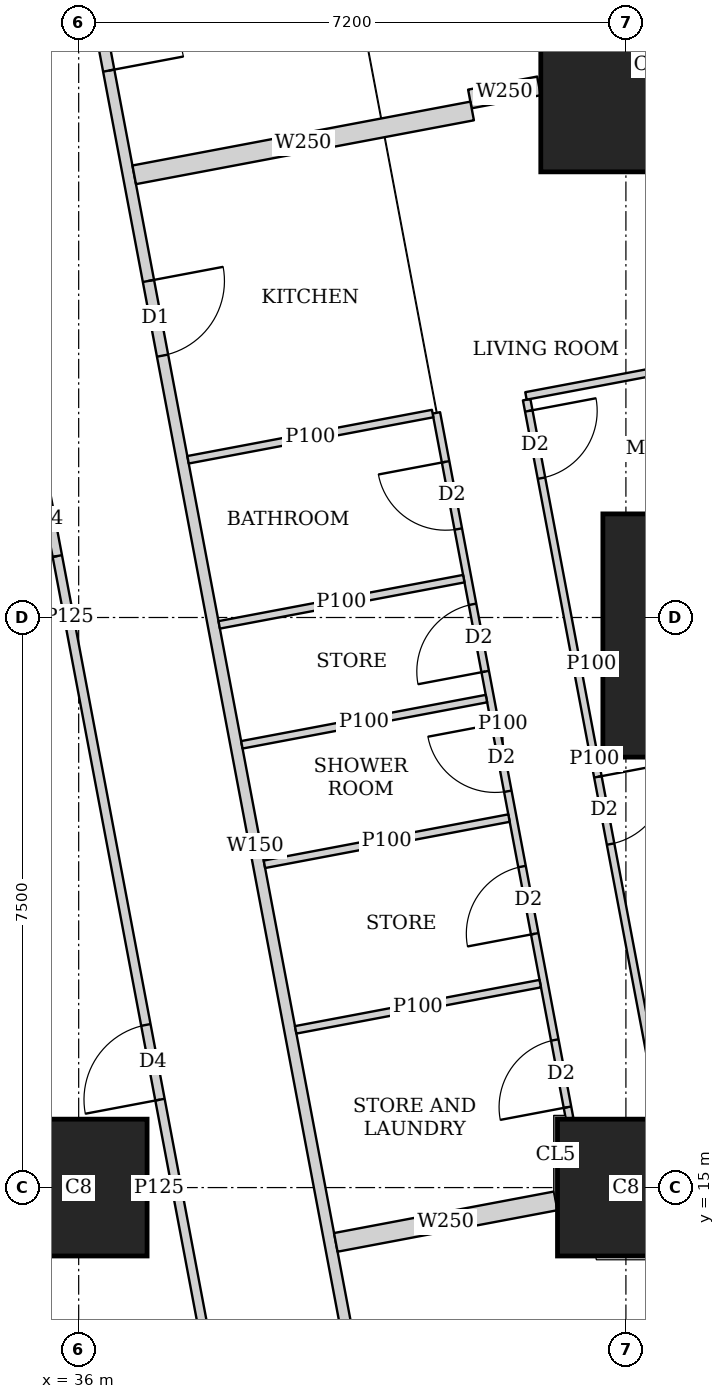
"""IFC4 building model, lengths in metres.
Left out: names, types, materials, properties, quantities, classifications, styles, units other than length and angle.
Written with IfcOpenShell. Run it as: python <this file> out.ifc"""

import sys

from ifc_helpers import new_model, si_unit, direction, frame, frame_2d, origin, origin_2d, place, context, subcontext, project, spatial, rectangle, extrude, element, fill, save


model = new_model("IFC4")
c1 = context("Model", 3, precision=1e-05, world=origin(), true_north=direction((0.0, 1.0)))
c2 = subcontext(c1, "Body", "Model", "MODEL_VIEW")
j1 = project(units=[si_unit("LENGTHUNIT", "METRE"), si_unit("PLANEANGLEUNIT", "RADIAN")], contexts=[c1])
p1 = place(None, origin())
s1 = spatial("IfcSite", under=j1, at=p1, CompositionType="ELEMENT")
p2 = place(p1, origin())
s2 = spatial("IfcBuilding", under=s1, at=p2, CompositionType="ELEMENT")
p3 = place(p2, frame((0.0, 0.0, 31.25)))
s3 = spatial("IfcBuildingStorey", under=s2, at=p3, CompositionType="ELEMENT", Elevation=31.25)
for number, where, z_axis, x_axis in (
    (1, (36.0, 15.0, 0.0), (0.0, 0.0, 1.0), (1.0, 0.0, 0.0)),
    (2, (43.2, 15.0, 0.0), (0.0, 0.0, 1.0), (1.0, 0.0, 0.0)),
):
    element("IfcColumn", number, at=place(p3, frame(where, z_axis=z_axis, x_axis=x_axis)), inside=s3, PredefinedType="COLUMN", context=c2, shape_type="SweptSolid", body=[
        extrude(rectangle(XDim=1.8, YDim=1.8, at=origin_2d()), origin(), (0.0, 0.0, 1.0), 3.75),
    ])
p4 = place(p3, frame((44.697, 22.263, 0.0), z_axis=(0.0, 0.0, 1.0), x_axis=(1.0, 0.0, 0.0)))
e3 = element("IfcColumn", 3, at=p4, inside=s3, PredefinedType="COLUMN", context=c2, shape_type="SweptSolid", body=[
    extrude(rectangle(XDim=3.6, YDim=3.2, at=origin_2d()), origin(), (0.0, 0.0, 1.0), 3.75),
])
p5 = place(p3, frame((43.48, 29.763, 0.0), z_axis=(0.0, 0.0, 1.0), x_axis=(1.0, 0.0, 0.0)))
e4 = element("IfcColumn", 4, at=p5, inside=s3, PredefinedType="COLUMN", context=c2, shape_type="SweptSolid", body=[
    extrude(rectangle(XDim=2.8, YDim=2.8, at=origin_2d()), origin(), (0.0, 0.0, 1.0), 3.75),
])
p6 = place(p3, frame((50.653, 2.703, 0.0), z_axis=(0.0, 0.0, 1.0), x_axis=(-0.185612026696, 0.982623109613, 0.0)))
e5 = element("IfcWall", 5, at=p6, inside=s3, PredefinedType="SOLIDWALL", context=c2, shape_type="SweptSolid", body=[
    extrude(rectangle(XDim=41.393, YDim=0.2, at=frame_2d((20.697, 0.0))), origin(), (0.0, 0.0, 1.0), 3.5),
])
p7 = place(p6, frame((1.633, 0.0, 0.9)))
e6 = element("IfcOpeningElement", 6, at=p7, cuts=e5, PredefinedType="OPENING", context=c2, shape_type="SweptSolid", body=[
    extrude(rectangle(XDim=1.8, YDim=1.5, at=frame_2d((0.9, 0.75))), frame((0.0, 0.11, 0.0), z_axis=(0.0, -1.0, 0.0), x_axis=(1.0, 0.0, 0.0)), (0.0, 0.0, 1.0), 0.22),
])
p8 = place(p6, frame((6.032, 0.0, 0.9)))
e7 = element("IfcOpeningElement", 7, at=p8, cuts=e5, PredefinedType="OPENING", context=c2, shape_type="SweptSolid", body=[
    extrude(rectangle(XDim=1.8, YDim=1.5, at=frame_2d((0.9, 0.75))), frame((0.0, 0.11, 0.0), z_axis=(0.0, -1.0, 0.0), x_axis=(1.0, 0.0, 0.0)), (0.0, 0.0, 1.0), 0.22),
])
p9 = place(p6, frame((9.848, 0.0, 0.9)))
e8 = element("IfcOpeningElement", 8, at=p9, cuts=e5, PredefinedType="OPENING", context=c2, shape_type="SweptSolid", body=[
    extrude(rectangle(XDim=1.8, YDim=1.5, at=frame_2d((0.9, 0.75))), frame((0.0, 0.11, 0.0), z_axis=(0.0, -1.0, 0.0), x_axis=(1.0, 0.0, 0.0)), (0.0, 0.0, 1.0), 0.22),
])
p10 = place(p6, frame((17.481, 0.0, 0.9)))
e9 = element("IfcOpeningElement", 9, at=p10, cuts=e5, PredefinedType="OPENING", context=c2, shape_type="SweptSolid", body=[
    extrude(rectangle(XDim=1.8, YDim=1.5, at=frame_2d((0.9, 0.75))), frame((0.0, 0.11, 0.0), z_axis=(0.0, -1.0, 0.0), x_axis=(1.0, 0.0, 0.0)), (0.0, 0.0, 1.0), 0.22),
])
p11 = place(p6, frame((21.297, 0.0, 0.9)))
e10 = element("IfcOpeningElement", 10, at=p11, cuts=e5, PredefinedType="OPENING", context=c2, shape_type="SweptSolid", body=[
    extrude(rectangle(XDim=1.8, YDim=1.5, at=frame_2d((0.9, 0.75))), frame((0.0, 0.11, 0.0), z_axis=(0.0, -1.0, 0.0), x_axis=(1.0, 0.0, 0.0)), (0.0, 0.0, 1.0), 0.22),
])
p12 = place(p6, frame((25.113, 0.0, 0.9)))
e11 = element("IfcOpeningElement", 11, at=p12, cuts=e5, PredefinedType="OPENING", context=c2, shape_type="SweptSolid", body=[
    extrude(rectangle(XDim=1.8, YDim=1.5, at=frame_2d((0.9, 0.75))), frame((0.0, 0.11, 0.0), z_axis=(0.0, -1.0, 0.0), x_axis=(1.0, 0.0, 0.0)), (0.0, 0.0, 1.0), 0.22),
])
p13 = place(p6, frame((28.93, 0.0, 0.9)))
e12 = element("IfcOpeningElement", 12, at=p13, cuts=e5, PredefinedType="OPENING", context=c2, shape_type="SweptSolid", body=[
    extrude(rectangle(XDim=1.8, YDim=1.5, at=frame_2d((0.9, 0.75))), frame((0.0, 0.11, 0.0), z_axis=(0.0, -1.0, 0.0), x_axis=(1.0, 0.0, 0.0)), (0.0, 0.0, 1.0), 0.22),
])
p14 = place(p6, frame((32.746, 0.0, 0.9)))
e13 = element("IfcOpeningElement", 13, at=p14, cuts=e5, PredefinedType="OPENING", context=c2, shape_type="SweptSolid", body=[
    extrude(rectangle(XDim=1.8, YDim=1.5, at=frame_2d((0.9, 0.75))), frame((0.0, 0.11, 0.0), z_axis=(0.0, -1.0, 0.0), x_axis=(1.0, 0.0, 0.0)), (0.0, 0.0, 1.0), 0.22),
])
p15 = place(p6, frame((36.481, 0.0, 0.9)))
e14 = element("IfcOpeningElement", 14, at=p15, cuts=e5, PredefinedType="OPENING", context=c2, shape_type="SweptSolid", body=[
    extrude(rectangle(XDim=1.8, YDim=1.5, at=frame_2d((0.9, 0.75))), frame((0.0, 0.11, 0.0), z_axis=(0.0, -1.0, 0.0), x_axis=(1.0, 0.0, 0.0)), (0.0, 0.0, 1.0), 0.22),
])
p16 = place(p3, frame((35.094, 36.585, 0.0), z_axis=(0.0, 0.0, 1.0), x_axis=(0.185588860311, -0.982627485331, 0.0)))
e15 = element("IfcWall", 15, at=p16, inside=s3, PredefinedType="SOLIDWALL", context=c2, shape_type="SweptSolid", body=[
    extrude(rectangle(XDim=34.797, YDim=0.15, at=frame_2d((17.399, 0.0))), origin(), (0.0, 0.0, 1.0), 2.5),
])
p17 = place(p16, frame((6.012, 0.0, 0.0)))
e16 = element("IfcOpeningElement", 16, at=p17, cuts=e15, PredefinedType="OPENING", context=c2, shape_type="SweptSolid", body=[
    extrude(rectangle(XDim=1.0, YDim=2.1, at=frame_2d((0.5, 1.05))), frame((0.0, 0.085, 0.0), z_axis=(0.0, -1.0, 0.0), x_axis=(1.0, 0.0, 0.0)), (0.0, 0.0, 1.0), 0.17),
])
p18 = place(p16, frame((9.828, 0.0, 0.0)))
e17 = element("IfcOpeningElement", 17, at=p18, cuts=e15, PredefinedType="OPENING", context=c2, shape_type="SweptSolid", body=[
    extrude(rectangle(XDim=1.0, YDim=2.1, at=frame_2d((0.5, 1.05))), frame((0.0, 0.085, 0.0), z_axis=(0.0, -1.0, 0.0), x_axis=(1.0, 0.0, 0.0)), (0.0, 0.0, 1.0), 0.17),
])
p19 = place(p16, frame((25.9, 0.0, 0.0)))
e18 = element("IfcOpeningElement", 18, at=p19, cuts=e15, PredefinedType="OPENING", context=c2, shape_type="SweptSolid", body=[
    extrude(rectangle(XDim=1.0, YDim=2.1, at=frame_2d((0.5, 1.05))), frame((0.0, 0.085, 0.0), z_axis=(0.0, -1.0, 0.0), x_axis=(1.0, 0.0, 0.0)), (0.0, 0.0, 1.0), 0.17),
])
p20 = place(p3, frame((41.894, 25.366, 0.0), z_axis=(0.0, 0.0, 1.0), x_axis=(0.185581190027, -0.982628933987, 0.0)))
e19 = element("IfcWall", 19, at=p20, inside=s3, PredefinedType="PARTITIONING", context=c2, shape_type="SweptSolid", body=[
    extrude(rectangle(XDim=9.623, YDim=0.1, at=frame_2d((4.812, 0.0))), origin(), (0.0, 0.0, 1.0), 2.5),
])
p21 = place(p20, frame((0.151, 0.0, 0.0)))
e20 = element("IfcOpeningElement", 20, at=p21, cuts=e19, PredefinedType="OPENING", context=c2, shape_type="SweptSolid", body=[
    extrude(rectangle(XDim=0.9, YDim=2.1, at=frame_2d((0.45, 1.05))), frame((0.0, 0.06, 0.0), z_axis=(0.0, -1.0, 0.0), x_axis=(1.0, 0.0, 0.0)), (0.0, 0.0, 1.0), 0.12),
])
p22 = place(p20, frame((5.05, 0.0, 0.0)))
e21 = element("IfcOpeningElement", 21, at=p22, cuts=e19, PredefinedType="OPENING", context=c2, shape_type="SweptSolid", body=[
    extrude(rectangle(XDim=0.9, YDim=2.1, at=frame_2d((0.45, 1.05))), frame((0.0, 0.06, 0.0), z_axis=(0.0, -1.0, 0.0), x_axis=(1.0, 0.0, 0.0)), (0.0, 0.0, 1.0), 0.12),
])
p23 = place(p3, frame((40.706, 25.192, 0.0), z_axis=(0.0, 0.0, 1.0), x_axis=(0.185572668944, -0.982630543257, 0.0)))
e22 = element("IfcWall", 22, at=p23, inside=s3, PredefinedType="PARTITIONING", context=c2, shape_type="SweptSolid", body=[
    extrude(rectangle(XDim=9.446, YDim=0.1, at=frame_2d((4.723, 0.0))), origin(), (0.0, 0.0, 1.0), 2.5),
])
p24 = place(p23, frame((0.655, 0.0, 0.0)))
e23 = element("IfcOpeningElement", 23, at=p24, cuts=e22, PredefinedType="OPENING", context=c2, shape_type="SweptSolid", body=[
    extrude(rectangle(XDim=0.9, YDim=2.1, at=frame_2d((0.45, 1.05))), frame((0.0, 0.06, 0.0), z_axis=(0.0, -1.0, 0.0), x_axis=(1.0, 0.0, 0.0)), (0.0, 0.0, 1.0), 0.12),
])
p25 = place(p23, frame((4.166, 0.0, 0.0)))
e24 = element("IfcOpeningElement", 24, at=p25, cuts=e22, PredefinedType="OPENING", context=c2, shape_type="SweptSolid", body=[
    extrude(rectangle(XDim=0.9, YDim=2.1, at=frame_2d((0.45, 1.05))), frame((0.0, 0.06, 0.0), z_axis=(0.0, -1.0, 0.0), x_axis=(1.0, 0.0, 0.0)), (0.0, 0.0, 1.0), 0.12),
])
p26 = place(p23, frame((8.396, 0.0, 0.0)))
e25 = element("IfcOpeningElement", 25, at=p26, cuts=e22, PredefinedType="OPENING", context=c2, shape_type="SweptSolid", body=[
    extrude(rectangle(XDim=0.9, YDim=2.1, at=frame_2d((0.45, 1.05))), frame((0.0, 0.06, 0.0), z_axis=(0.0, -1.0, 0.0), x_axis=(1.0, 0.0, 0.0)), (0.0, 0.0, 1.0), 0.12),
])
p27 = place(p23, frame((2.563, 0.0, 0.0)))
e26 = element("IfcOpeningElement", 26, at=p27, cuts=e22, PredefinedType="OPENING", context=c2, shape_type="SweptSolid", body=[
    extrude(rectangle(XDim=0.9, YDim=2.1, at=frame_2d((0.45, 1.05))), frame((0.0, 0.06, 0.0), z_axis=(0.0, -1.0, 0.0), x_axis=(1.0, 0.0, 0.0)), (0.0, 0.0, 1.0), 0.12),
])
p28 = place(p23, frame((6.074, 0.0, 0.0)))
e27 = element("IfcOpeningElement", 27, at=p28, cuts=e22, PredefinedType="OPENING", context=c2, shape_type="SweptSolid", body=[
    extrude(rectangle(XDim=0.9, YDim=2.1, at=frame_2d((0.45, 1.05))), frame((0.0, 0.06, 0.0), z_axis=(0.0, -1.0, 0.0), x_axis=(1.0, 0.0, 0.0)), (0.0, 0.0, 1.0), 0.12),
])
p29 = place(p3, frame((46.11, 26.213, 0.0), z_axis=(0.0, 0.0, 1.0), x_axis=(-0.982633535512, -0.185556823879, 0.0)))
e28 = element("IfcWall", 28, at=p29, inside=s3, PredefinedType="PARTITIONING", context=c2, shape_type="SweptSolid", body=[
    extrude(rectangle(XDim=4.3, YDim=0.1, at=frame_2d((2.15, 0.0))), origin(), (0.0, 0.0, 1.0), 2.05),
])
p30 = place(p3, frame((42.887, 21.921, 0.0), z_axis=(0.0, 0.0, 1.0), x_axis=(-0.982688058078, -0.185267861514, 0.0)))
e29 = element("IfcWall", 29, at=p30, inside=s3, PredefinedType="PARTITIONING", context=c2, shape_type="SweptSolid", body=[
    extrude(rectangle(XDim=0.286, YDim=0.1, at=frame_2d((0.143, 0.0))), origin(), (0.0, 0.0, 1.0), 2.5),
])
for number, where, z_axis, x_axis in (
    (30, (40.657, 25.183, 0.0), (0.0, 0.0, 1.0), (-0.983, -0.186, 0.0)),
    (31, (41.365, 21.433, 0.0), (0.0, 0.0, 1.0), (-0.983, -0.186, 0.0)),
    (32, (42.073, 17.683, 0.0), (0.0, 0.0, 1.0), (-0.983, -0.186, 0.0)),
):
    element("IfcWall", number, at=place(p3, frame(where, z_axis=z_axis, x_axis=x_axis)), inside=s3, PredefinedType="PARTITIONING", context=c2, shape_type="SweptSolid", body=[
        extrude(rectangle(XDim=3.275, YDim=0.1, at=frame_2d((1.637, 0.0))), origin(), (0.0, 0.0, 1.0), 3.5),
    ])
p31 = place(p3, frame((41.067, 23.011, 0.0), z_axis=(0.0, 0.0, 1.0), x_axis=(-0.982618057925, -0.185638768151, 0.0)))
e33 = element("IfcWall", 33, at=p31, inside=s3, PredefinedType="PARTITIONING", context=c2, shape_type="SweptSolid", body=[
    extrude(rectangle(XDim=3.275, YDim=0.1, at=frame_2d((1.637, 0.0))), origin(), (0.0, 0.0, 1.0), 2.5),
])
p32 = place(p3, frame((41.662, 19.861, 0.0), z_axis=(0.0, 0.0, 1.0), x_axis=(-0.982607026909, -0.185697147715, 0.0)))
e34 = element("IfcWall", 34, at=p32, inside=s3, PredefinedType="PARTITIONING", context=c2, shape_type="SweptSolid", body=[
    extrude(rectangle(XDim=3.275, YDim=0.1, at=frame_2d((1.637, 0.0))), origin(), (0.0, 0.0, 1.0), 3.5),
])
p33 = place(p3, frame((42.056, 29.494, 0.0), z_axis=(0.0, 0.0, 1.0), x_axis=(-0.982587178881, -0.185802141803, 0.0)))
e35 = element("IfcWall", 35, at=p33, inside=s3, PredefinedType="SOLIDWALL", context=c2, shape_type="SweptSolid", body=[
    extrude(rectangle(XDim=0.925, YDim=0.25, at=frame_2d((0.462, 0.0))), origin(), (0.0, 0.0, 1.0), 2.5),
])
p34 = place(p3, frame((41.177, 29.164, 0.0), z_axis=(0.0, 0.0, 1.0), x_axis=(-0.982612837616, -0.185666398014, 0.0)))
e36 = element("IfcWall", 36, at=p34, inside=s3, PredefinedType="SOLIDWALL", context=c2, shape_type="SweptSolid", body=[
    extrude(rectangle(XDim=4.525, YDim=0.25, at=frame_2d((2.262, 0.0))), origin(), (0.0, 0.0, 1.0), 2.5),
])
p35 = place(p3, frame((42.276, 14.825, 0.0), z_axis=(0.0, 0.0, 1.0), x_axis=(-0.982656521819, -0.185435056358, 0.0)))
e37 = element("IfcWall", 37, at=p35, inside=s3, PredefinedType="SOLIDWALL", context=c2, shape_type="SweptSolid", body=[
    extrude(rectangle(XDim=2.944, YDim=0.25, at=frame_2d((1.472, 0.0))), origin(), (0.0, 0.0, 1.0), 3.5),
])
p36 = place(p3, frame((38.202, 10.163, 0.0), z_axis=(0.0, 0.0, 1.0), x_axis=(-0.185610321132, 0.982623431783, 0.0)))
e38 = element("IfcWall", 38, at=p36, inside=s3, PredefinedType="PARTITIONING", context=c2, shape_type="SweptSolid", body=[
    extrude(rectangle(XDim=25.111, YDim=0.125, at=frame_2d((12.556, 0.0))), origin(), (0.0, 0.0, 1.0), 2.5),
])
p37 = place(p36, frame((0.708, 0.0, 0.0)))
e39 = element("IfcOpeningElement", 39, at=p37, cuts=e38, PredefinedType="OPENING", context=c2, shape_type="SweptSolid", body=[
    extrude(rectangle(XDim=1.0, YDim=2.1, at=frame_2d((0.5, 1.05))), frame((0.0, 0.073, 0.0), z_axis=(0.0, -1.0, 0.0), x_axis=(1.0, 0.0, 0.0)), (0.0, 0.0, 1.0), 0.145),
])
p38 = place(p36, frame((6.1, 0.0, 0.0)))
e40 = element("IfcOpeningElement", 40, at=p38, cuts=e38, PredefinedType="OPENING", context=c2, shape_type="SweptSolid", body=[
    extrude(rectangle(XDim=1.0, YDim=2.1, at=frame_2d((0.5, 1.05))), frame((0.0, 0.073, 0.0), z_axis=(0.0, -1.0, 0.0), x_axis=(1.0, 0.0, 0.0)), (0.0, 0.0, 1.0), 0.145),
])
p39 = place(p36, frame((13.378, 0.0, 0.0)))
e41 = element("IfcOpeningElement", 41, at=p39, cuts=e38, PredefinedType="OPENING", context=c2, shape_type="SweptSolid", body=[
    extrude(rectangle(XDim=1.0, YDim=2.1, at=frame_2d((0.5, 1.05))), frame((0.0, 0.073, 0.0), z_axis=(0.0, -1.0, 0.0), x_axis=(1.0, 0.0, 0.0)), (0.0, 0.0, 1.0), 0.145),
])
p40 = place(p36, frame((17.194, 0.0, 0.0)))
e42 = element("IfcOpeningElement", 42, at=p40, cuts=e38, PredefinedType="OPENING", context=c2, shape_type="SweptSolid", body=[
    extrude(rectangle(XDim=1.0, YDim=2.1, at=frame_2d((0.5, 1.05))), frame((0.0, 0.073, 0.0), z_axis=(0.0, -1.0, 0.0), x_axis=(1.0, 0.0, 0.0)), (0.0, 0.0, 1.0), 0.145),
])
p41 = place(p36, frame((21.35, 0.0, 0.0)))
e43 = element("IfcOpeningElement", 43, at=p41, cuts=e38, PredefinedType="OPENING", context=c2, shape_type="SweptSolid", body=[
    extrude(rectangle(XDim=1.0, YDim=2.1, at=frame_2d((0.5, 1.05))), frame((0.0, 0.073, 0.0), z_axis=(0.0, -1.0, 0.0), x_axis=(1.0, 0.0, 0.0)), (0.0, 0.0, 1.0), 0.145),
])
p42 = place(p3, frame((36.901, 15.0, 0.0), z_axis=(0.0, 0.0, 1.0), x_axis=(1.0, 0.0, 0.0)))
e44 = element("IfcWall", 44, at=p42, inside=s3, PredefinedType="PARTITIONING", context=c2, shape_type="SweptSolid", body=[
    extrude(rectangle(XDim=0.312, YDim=0.125, at=frame_2d((0.156, 0.0))), origin(), (0.0, 0.0, 1.0), 3.5),
])
p43 = place(p3, frame((33.901, 22.5, 0.0), z_axis=(0.0, 0.0, 1.0), x_axis=(1.0, 0.0, 0.0)))
e45 = element("IfcWall", 45, at=p43, inside=s3, PredefinedType="PARTITIONING", context=c2, shape_type="SweptSolid", body=[
    extrude(rectangle(XDim=1.895, YDim=0.125, at=frame_2d((0.948, 0.0))), origin(), (0.0, 0.0, 1.0), 2.5),
])
p44 = place(p17, origin())
e46 = element("IfcDoor", 46, at=p44, inside=s3, OperationType="SINGLE_SWING_RIGHT", PredefinedType="DOOR", context=c2, shape_type="SweptSolid", body=[
    extrude(rectangle(XDim=1.0, YDim=2.1, at=frame_2d((0.5, 1.05))), frame((0.0, 0.025, 0.0), z_axis=(0.0, -1.0, 0.0), x_axis=(1.0, 0.0, 0.0)), (0.0, 0.0, 1.0), 0.05),
])
fill(e16, e46)
p45 = place(p21, origin())
e47 = element("IfcDoor", 47, at=p45, inside=s3, OperationType="SINGLE_SWING_LEFT", PredefinedType="DOOR", context=c2, shape_type="SweptSolid", body=[
    extrude(rectangle(XDim=0.9, YDim=2.1, at=frame_2d((0.45, 1.05))), frame((0.0, 0.025, 0.0), z_axis=(0.0, -1.0, 0.0), x_axis=(1.0, 0.0, 0.0)), (0.0, 0.0, 1.0), 0.05),
])
fill(e20, e47)
p46 = place(p22, origin())
e48 = element("IfcDoor", 48, at=p46, inside=s3, OperationType="SINGLE_SWING_LEFT", PredefinedType="DOOR", context=c2, shape_type="SweptSolid", body=[
    extrude(rectangle(XDim=0.9, YDim=2.1, at=frame_2d((0.45, 1.05))), frame((0.0, 0.025, 0.0), z_axis=(0.0, -1.0, 0.0), x_axis=(1.0, 0.0, 0.0)), (0.0, 0.0, 1.0), 0.05),
])
fill(e21, e48)
p47 = place(p24, origin())
e49 = element("IfcDoor", 49, at=p47, inside=s3, OperationType="SINGLE_SWING_RIGHT", PredefinedType="DOOR", context=c2, shape_type="SweptSolid", body=[
    extrude(rectangle(XDim=0.9, YDim=2.1, at=frame_2d((0.45, 1.05))), frame((0.0, 0.025, 0.0), z_axis=(0.0, -1.0, 0.0), x_axis=(1.0, 0.0, 0.0)), (0.0, 0.0, 1.0), 0.05),
])
fill(e23, e49)
p48 = place(p25, origin())
e50 = element("IfcDoor", 50, at=p48, inside=s3, OperationType="SINGLE_SWING_RIGHT", PredefinedType="DOOR", context=c2, shape_type="SweptSolid", body=[
    extrude(rectangle(XDim=0.9, YDim=2.1, at=frame_2d((0.45, 1.05))), frame((0.0, 0.025, 0.0), z_axis=(0.0, -1.0, 0.0), x_axis=(1.0, 0.0, 0.0)), (0.0, 0.0, 1.0), 0.05),
])
fill(e24, e50)
p49 = place(p26, origin())
e51 = element("IfcDoor", 51, at=p49, inside=s3, OperationType="SINGLE_SWING_LEFT", PredefinedType="DOOR", context=c2, shape_type="SweptSolid", body=[
    extrude(rectangle(XDim=0.9, YDim=2.1, at=frame_2d((0.45, 1.05))), frame((0.0, 0.025, 0.0), z_axis=(0.0, -1.0, 0.0), x_axis=(1.0, 0.0, 0.0)), (0.0, 0.0, 1.0), 0.05),
])
fill(e25, e51)
p50 = place(p27, origin())
e52 = element("IfcDoor", 52, at=p50, inside=s3, OperationType="SINGLE_SWING_LEFT", PredefinedType="DOOR", context=c2, shape_type="SweptSolid", body=[
    extrude(rectangle(XDim=0.9, YDim=2.1, at=frame_2d((0.45, 1.05))), frame((0.0, 0.025, 0.0), z_axis=(0.0, -1.0, 0.0), x_axis=(1.0, 0.0, 0.0)), (0.0, 0.0, 1.0), 0.05),
])
fill(e26, e52)
p51 = place(p28, origin())
e53 = element("IfcDoor", 53, at=p51, inside=s3, OperationType="SINGLE_SWING_LEFT", PredefinedType="DOOR", context=c2, shape_type="SweptSolid", body=[
    extrude(rectangle(XDim=0.9, YDim=2.1, at=frame_2d((0.45, 1.05))), frame((0.0, 0.025, 0.0), z_axis=(0.0, -1.0, 0.0), x_axis=(1.0, 0.0, 0.0)), (0.0, 0.0, 1.0), 0.05),
])
fill(e27, e53)
p52 = place(p18, origin())
e54 = element("IfcDoor", 54, at=p52, inside=s3, OperationType="SINGLE_SWING_LEFT", PredefinedType="DOOR", context=c2, shape_type="SweptSolid", body=[
    extrude(rectangle(XDim=1.0, YDim=2.1, at=frame_2d((0.5, 1.05))), frame((0.0, 0.025, 0.0), z_axis=(0.0, -1.0, 0.0), x_axis=(1.0, 0.0, 0.0)), (0.0, 0.0, 1.0), 0.05),
])
fill(e17, e54)
p53 = place(p38, origin())
e55 = element("IfcDoor", 55, at=p53, inside=s3, OperationType="SINGLE_SWING_LEFT", PredefinedType="DOOR", context=c2, shape_type="SweptSolid", body=[
    extrude(rectangle(XDim=1.0, YDim=2.1, at=frame_2d((0.5, 1.05))), frame((0.0, 0.025, 0.0), z_axis=(0.0, -1.0, 0.0), x_axis=(1.0, 0.0, 0.0)), (0.0, 0.0, 1.0), 0.05),
])
fill(e40, e55)
p54 = place(p39, origin())
e56 = element("IfcDoor", 56, at=p54, inside=s3, OperationType="SINGLE_SWING_LEFT", PredefinedType="DOOR", context=c2, shape_type="SweptSolid", body=[
    extrude(rectangle(XDim=1.0, YDim=2.1, at=frame_2d((0.5, 1.05))), frame((0.0, 0.025, 0.0), z_axis=(0.0, -1.0, 0.0), x_axis=(1.0, 0.0, 0.0)), (0.0, 0.0, 1.0), 0.05),
])
fill(e41, e56)
save(model, sys.argv[1])
